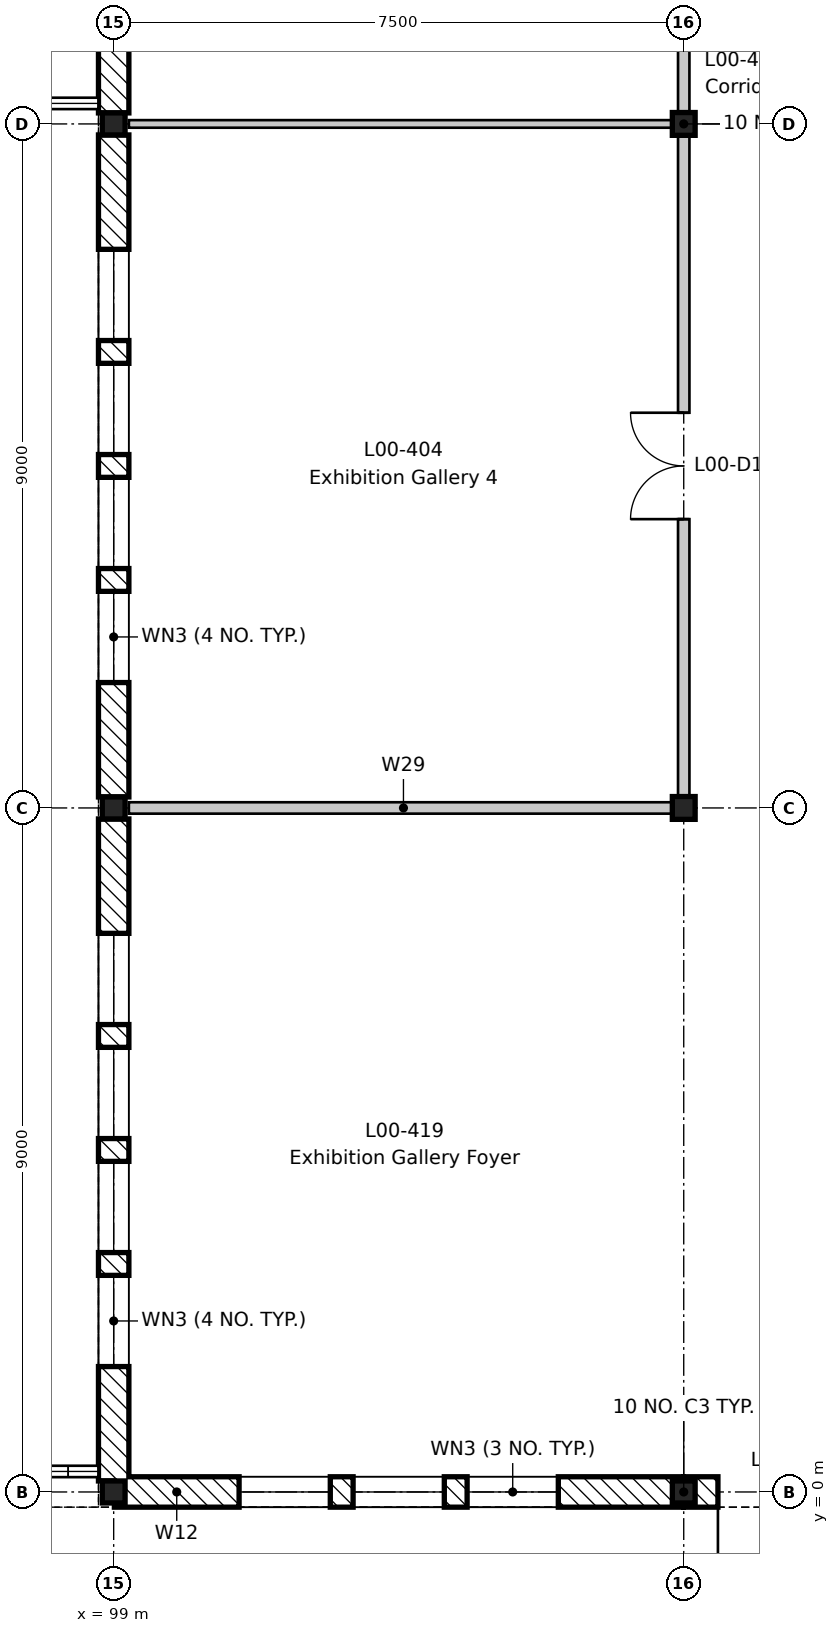
"""IFC4 building model, lengths in metres.
Left out: names, types, materials, properties, quantities, classifications, styles, units other than length and angle.
Written with IfcOpenShell. Run it as: python <this file> out.ifc"""

import sys

from ifc_helpers import new_model, si_unit, direction, frame, frame_2d, origin, origin_2d, place, context, subcontext, project, spatial, rectangle, i_section, extrude, element, fill, save


model = new_model("IFC4")
c1 = context("Model", 3, precision=1e-05, world=origin(), true_north=direction((0.0, 1.0)))
c2 = subcontext(c1, "Body", "Model", "MODEL_VIEW")
j1 = project(units=[si_unit("LENGTHUNIT", "METRE"), si_unit("PLANEANGLEUNIT", "RADIAN")], contexts=[c1])
p1 = place(None, origin())
s1 = spatial("IfcSite", under=j1, at=p1, CompositionType="ELEMENT")
p2 = place(p1, origin())
s2 = spatial("IfcBuilding", under=s1, at=p2, CompositionType="ELEMENT")
p3 = place(p2, origin())
s3 = spatial("IfcBuildingStorey", under=s2, at=p3, CompositionType="ELEMENT", Elevation=0.0)
for number, where, z_axis, x_axis in (
    (1, (99.0, 0.0, -0.6), (0.0, 0.0, 1.0), (1.0, 0.0, 0.0)),
    (2, (99.0, 9.0, -0.6), (0.0, 0.0, 1.0), (1.0, 0.0, 0.0)),
    (3, (99.0, 18.0, -0.6), (0.0, 0.0, 1.0), (1.0, 0.0, 0.0)),
    (4, (106.5, 0.0, -0.6), (0.0, 0.0, 1.0), (1.0, 0.0, 0.0)),
):
    element("IfcColumn", number, at=place(p3, frame(where, z_axis=z_axis, x_axis=x_axis)), inside=s3, PredefinedType="COLUMN", context=c2, shape_type="SweptSolid", body=[
        extrude(i_section(OverallWidth=0.3, OverallDepth=0.29, WebThickness=0.009, FlangeThickness=0.014, FilletRadius=0.027, at=origin_2d()), origin(), (0.0, 0.0, 1.0), 5.8),
    ])
for number, where, z_axis, x_axis in (
    (5, (106.5, 9.0, -0.6), (0.0, 0.0, 1.0), (1.0, 0.0, 0.0)),
    (6, (106.5, 18.0, -0.6), (0.0, 0.0, 1.0), (1.0, 0.0, 0.0)),
):
    element("IfcColumn", number, at=place(p3, frame(where, z_axis=z_axis, x_axis=x_axis)), inside=s3, PredefinedType="COLUMN", context=c2, shape_type="SweptSolid", body=[
        extrude(i_section(OverallWidth=0.3, OverallDepth=0.3, WebThickness=0.011, FlangeThickness=0.019, FilletRadius=0.027, at=origin_2d()), origin(), (0.0, 0.0, 1.0), 5.8),
    ])
p4 = place(p3, frame((99.0, 0.145, 0.0), z_axis=(0.0, 0.0, 1.0), x_axis=(0.0, 1.0, 0.0)))
e7 = element("IfcWall", 7, at=p4, inside=s3, PredefinedType="STANDARD", context=c2, shape_type="SweptSolid", body=[
    extrude(rectangle(XDim=8.71, YDim=0.4, at=frame_2d((4.355, 0.0))), origin(), (0.0, 0.0, 1.0), 4.8),
])
p5 = place(p4, frame((1.505, 0.0, 0.6)))
e8 = element("IfcOpeningElement", 8, at=p5, cuts=e7, PredefinedType="OPENING", context=c2, shape_type="SweptSolid", body=[
    extrude(rectangle(XDim=1.2, YDim=3.9, at=frame_2d((0.6, 1.95))), frame((0.0, 0.21, 0.0), z_axis=(0.0, -1.0, 0.0), x_axis=(1.0, 0.0, 0.0)), (0.0, 0.0, 1.0), 0.42),
])
p6 = place(p4, frame((3.005, 0.0, 0.6)))
e9 = element("IfcOpeningElement", 9, at=p6, cuts=e7, PredefinedType="OPENING", context=c2, shape_type="SweptSolid", body=[
    extrude(rectangle(XDim=1.2, YDim=3.9, at=frame_2d((0.6, 1.95))), frame((0.0, 0.21, 0.0), z_axis=(0.0, -1.0, 0.0), x_axis=(1.0, 0.0, 0.0)), (0.0, 0.0, 1.0), 0.42),
])
p7 = place(p4, frame((4.505, 0.0, 0.6)))
e10 = element("IfcOpeningElement", 10, at=p7, cuts=e7, PredefinedType="OPENING", context=c2, shape_type="SweptSolid", body=[
    extrude(rectangle(XDim=1.2, YDim=3.9, at=frame_2d((0.6, 1.95))), frame((0.0, 0.21, 0.0), z_axis=(0.0, -1.0, 0.0), x_axis=(1.0, 0.0, 0.0)), (0.0, 0.0, 1.0), 0.42),
])
p8 = place(p4, frame((6.005, 0.0, 0.6)))
e11 = element("IfcOpeningElement", 11, at=p8, cuts=e7, PredefinedType="OPENING", context=c2, shape_type="SweptSolid", body=[
    extrude(rectangle(XDim=1.2, YDim=3.9, at=frame_2d((0.6, 1.95))), frame((0.0, 0.21, 0.0), z_axis=(0.0, -1.0, 0.0), x_axis=(1.0, 0.0, 0.0)), (0.0, 0.0, 1.0), 0.42),
])
p9 = place(p3, frame((99.0, 9.145, 0.0), z_axis=(0.0, 0.0, 1.0), x_axis=(0.0, 1.0, 0.0)))
e12 = element("IfcWall", 12, at=p9, inside=s3, PredefinedType="STANDARD", context=c2, shape_type="SweptSolid", body=[
    extrude(rectangle(XDim=8.71, YDim=0.4, at=frame_2d((4.355, 0.0))), origin(), (0.0, 0.0, 1.0), 4.8),
])
p10 = place(p9, frame((1.505, 0.0, 0.6)))
e13 = element("IfcOpeningElement", 13, at=p10, cuts=e12, PredefinedType="OPENING", context=c2, shape_type="SweptSolid", body=[
    extrude(rectangle(XDim=1.2, YDim=3.9, at=frame_2d((0.6, 1.95))), frame((0.0, 0.21, 0.0), z_axis=(0.0, -1.0, 0.0), x_axis=(1.0, 0.0, 0.0)), (0.0, 0.0, 1.0), 0.42),
])
p11 = place(p9, frame((3.005, 0.0, 0.6)))
e14 = element("IfcOpeningElement", 14, at=p11, cuts=e12, PredefinedType="OPENING", context=c2, shape_type="SweptSolid", body=[
    extrude(rectangle(XDim=1.2, YDim=3.9, at=frame_2d((0.6, 1.95))), frame((0.0, 0.21, 0.0), z_axis=(0.0, -1.0, 0.0), x_axis=(1.0, 0.0, 0.0)), (0.0, 0.0, 1.0), 0.42),
])
p12 = place(p9, frame((4.505, 0.0, 0.6)))
e15 = element("IfcOpeningElement", 15, at=p12, cuts=e12, PredefinedType="OPENING", context=c2, shape_type="SweptSolid", body=[
    extrude(rectangle(XDim=1.2, YDim=3.9, at=frame_2d((0.6, 1.95))), frame((0.0, 0.21, 0.0), z_axis=(0.0, -1.0, 0.0), x_axis=(1.0, 0.0, 0.0)), (0.0, 0.0, 1.0), 0.42),
])
p13 = place(p9, frame((6.005, 0.0, 0.6)))
e16 = element("IfcOpeningElement", 16, at=p13, cuts=e12, PredefinedType="OPENING", context=c2, shape_type="SweptSolid", body=[
    extrude(rectangle(XDim=1.2, YDim=3.9, at=frame_2d((0.6, 1.95))), frame((0.0, 0.21, 0.0), z_axis=(0.0, -1.0, 0.0), x_axis=(1.0, 0.0, 0.0)), (0.0, 0.0, 1.0), 0.42),
])
p14 = place(p3, frame((99.0, 18.145, 0.0), z_axis=(0.0, 0.0, 1.0), x_axis=(0.0, 1.0, 0.0)))
e17 = element("IfcWall", 17, at=p14, inside=s3, PredefinedType="STANDARD", context=c2, shape_type="SweptSolid", body=[
    extrude(rectangle(XDim=8.71, YDim=0.4, at=frame_2d((4.355, 0.0))), origin(), (0.0, 0.0, 1.0), 4.8),
])
p15 = place(p14, frame((1.505, 0.0, 0.6)))
e18 = element("IfcOpeningElement", 18, at=p15, cuts=e17, PredefinedType="OPENING", context=c2, shape_type="SweptSolid", body=[
    extrude(rectangle(XDim=1.2, YDim=3.9, at=frame_2d((0.6, 1.95))), frame((0.0, 0.21, 0.0), z_axis=(0.0, -1.0, 0.0), x_axis=(1.0, 0.0, 0.0)), (0.0, 0.0, 1.0), 0.42),
])
p16 = place(p14, frame((3.005, 0.0, 0.6)))
e19 = element("IfcOpeningElement", 19, at=p16, cuts=e17, PredefinedType="OPENING", context=c2, shape_type="SweptSolid", body=[
    extrude(rectangle(XDim=1.2, YDim=3.9, at=frame_2d((0.6, 1.95))), frame((0.0, 0.21, 0.0), z_axis=(0.0, -1.0, 0.0), x_axis=(1.0, 0.0, 0.0)), (0.0, 0.0, 1.0), 0.42),
])
p17 = place(p14, frame((4.505, 0.0, 0.6)))
e20 = element("IfcOpeningElement", 20, at=p17, cuts=e17, PredefinedType="OPENING", context=c2, shape_type="SweptSolid", body=[
    extrude(rectangle(XDim=1.2, YDim=3.9, at=frame_2d((0.6, 1.95))), frame((0.0, 0.21, 0.0), z_axis=(0.0, -1.0, 0.0), x_axis=(1.0, 0.0, 0.0)), (0.0, 0.0, 1.0), 0.42),
])
p18 = place(p14, frame((6.005, 0.0, 0.6)))
e21 = element("IfcOpeningElement", 21, at=p18, cuts=e17, PredefinedType="OPENING", context=c2, shape_type="SweptSolid", body=[
    extrude(rectangle(XDim=1.2, YDim=3.9, at=frame_2d((0.6, 1.95))), frame((0.0, 0.21, 0.0), z_axis=(0.0, -1.0, 0.0), x_axis=(1.0, 0.0, 0.0)), (0.0, 0.0, 1.0), 0.42),
])
p19 = place(p3, frame((106.491, 0.0, 0.0), z_axis=(0.0, 0.0, 1.0), x_axis=(-1.0, 0.0, 0.0)))
e22 = element("IfcWall", 22, at=p19, inside=s3, PredefinedType="STANDARD", context=c2, shape_type="SweptSolid", body=[
    extrude(rectangle(XDim=7.481, YDim=0.4, at=frame_2d((3.741, 0.0))), origin(), (0.0, 0.0, 1.0), 4.87),
])
p20 = place(p19, frame((4.641, 0.0, 0.6)))
e23 = element("IfcOpeningElement", 23, at=p20, cuts=e22, PredefinedType="OPENING", context=c2, shape_type="SweptSolid", body=[
    extrude(rectangle(XDim=1.2, YDim=3.9, at=frame_2d((0.6, 1.95))), frame((0.0, 0.21, 0.0), z_axis=(0.0, -1.0, 0.0), x_axis=(1.0, 0.0, 0.0)), (0.0, 0.0, 1.0), 0.42),
])
p21 = place(p19, frame((3.141, 0.0, 0.6)))
e24 = element("IfcOpeningElement", 24, at=p21, cuts=e22, PredefinedType="OPENING", context=c2, shape_type="SweptSolid", body=[
    extrude(rectangle(XDim=1.2, YDim=3.9, at=frame_2d((0.6, 1.95))), frame((0.0, 0.21, 0.0), z_axis=(0.0, -1.0, 0.0), x_axis=(1.0, 0.0, 0.0)), (0.0, 0.0, 1.0), 0.42),
])
p22 = place(p19, frame((1.641, 0.0, 0.6)))
e25 = element("IfcOpeningElement", 25, at=p22, cuts=e22, PredefinedType="OPENING", context=c2, shape_type="SweptSolid", body=[
    extrude(rectangle(XDim=1.2, YDim=3.9, at=frame_2d((0.6, 1.95))), frame((0.0, 0.21, 0.0), z_axis=(0.0, -1.0, 0.0), x_axis=(1.0, 0.0, 0.0)), (0.0, 0.0, 1.0), 0.42),
])
p23 = place(p3, frame((109.491, 0.0, 0.0), z_axis=(0.0, 0.0, 1.0), x_axis=(-1.0, 0.0, 0.0)))
e26 = element("IfcWall", 26, at=p23, inside=s3, PredefinedType="STANDARD", context=c2, shape_type="SweptSolid", body=[
    extrude(rectangle(XDim=2.981, YDim=0.4, at=frame_2d((1.491, 0.0))), origin(), (0.0, 0.0, 1.0), 5.0),
])
p24 = place(p23, frame((0.441, 0.0, 0.0)))
e27 = element("IfcOpeningElement", 27, at=p24, cuts=e26, PredefinedType="OPENING", context=c2, shape_type="SweptSolid", body=[
    extrude(rectangle(XDim=2.1, YDim=2.4, at=frame_2d((1.05, 1.2))), frame((0.0, 0.21, 0.0), z_axis=(0.0, -1.0, 0.0), x_axis=(1.0, 0.0, 0.0)), (0.0, 0.0, 1.0), 0.42),
])
p25 = place(p3, frame((99.2, 9.0, 0.0), z_axis=(0.0, 0.0, 1.0), x_axis=(1.0, 0.0, 0.0)))
e28 = element("IfcWall", 28, at=p25, inside=s3, PredefinedType="PARTITIONING", context=c2, shape_type="SweptSolid", body=[
    extrude(rectangle(XDim=7.225, YDim=0.15, at=frame_2d((3.613, 0.0))), origin(), (0.0, 0.0, 1.0), 4.85),
])
p26 = place(p3, frame((99.2, 18.0, 0.0), z_axis=(0.0, 0.0, 1.0), x_axis=(1.0, 0.0, 0.0)))
e29 = element("IfcWall", 29, at=p26, inside=s3, PredefinedType="PARTITIONING", context=c2, shape_type="SweptSolid", body=[
    extrude(rectangle(XDim=7.225, YDim=0.1, at=frame_2d((3.613, 0.0))), origin(), (0.0, 0.0, 1.0), 4.85),
])
p27 = place(p3, frame((106.5, 9.0, 0.0), z_axis=(0.0, 0.0, 1.0), x_axis=(0.0, 1.0, 0.0)))
e30 = element("IfcWall", 30, at=p27, inside=s3, PredefinedType="PARTITIONING", context=c2, shape_type="SweptSolid", body=[
    extrude(rectangle(XDim=44.8, YDim=0.15, at=frame_2d((22.4, 0.0))), origin(), (0.0, 0.0, 1.0), 4.68),
])
p28 = place(p27, frame((3.8, 0.0, 0.0)))
e31 = element("IfcOpeningElement", 31, at=p28, cuts=e30, PredefinedType="OPENING", context=c2, shape_type="SweptSolid", body=[
    extrude(rectangle(XDim=1.4, YDim=2.1, at=frame_2d((0.7, 1.05))), frame((0.0, 0.085, 0.0), z_axis=(0.0, -1.0, 0.0), x_axis=(1.0, 0.0, 0.0)), (0.0, 0.0, 1.0), 0.17),
])
p29 = place(p27, frame((12.8, 0.0, 0.0)))
e32 = element("IfcOpeningElement", 32, at=p29, cuts=e30, PredefinedType="OPENING", context=c2, shape_type="SweptSolid", body=[
    extrude(rectangle(XDim=1.4, YDim=2.1, at=frame_2d((0.7, 1.05))), frame((0.0, 0.085, 0.0), z_axis=(0.0, -1.0, 0.0), x_axis=(1.0, 0.0, 0.0)), (0.0, 0.0, 1.0), 0.17),
])
p30 = place(p27, frame((21.8, 0.0, 0.0)))
e33 = element("IfcOpeningElement", 33, at=p30, cuts=e30, PredefinedType="OPENING", context=c2, shape_type="SweptSolid", body=[
    extrude(rectangle(XDim=1.4, YDim=2.1, at=frame_2d((0.7, 1.05))), frame((0.0, 0.085, 0.0), z_axis=(0.0, -1.0, 0.0), x_axis=(1.0, 0.0, 0.0)), (0.0, 0.0, 1.0), 0.17),
])
p31 = place(p27, frame((30.8, 0.0, 0.0)))
e34 = element("IfcOpeningElement", 34, at=p31, cuts=e30, PredefinedType="OPENING", context=c2, shape_type="SweptSolid", body=[
    extrude(rectangle(XDim=1.4, YDim=2.1, at=frame_2d((0.7, 1.05))), frame((0.0, 0.085, 0.0), z_axis=(0.0, -1.0, 0.0), x_axis=(1.0, 0.0, 0.0)), (0.0, 0.0, 1.0), 0.17),
])
p32 = place(p27, frame((39.8, 0.0, 0.0)))
e35 = element("IfcOpeningElement", 35, at=p32, cuts=e30, PredefinedType="OPENING", context=c2, shape_type="SweptSolid", body=[
    extrude(rectangle(XDim=1.4, YDim=2.1, at=frame_2d((0.7, 1.05))), frame((0.0, 0.085, 0.0), z_axis=(0.0, -1.0, 0.0), x_axis=(1.0, 0.0, 0.0)), (0.0, 0.0, 1.0), 0.17),
])
p33 = place(p5, origin())
e36 = element("IfcWindow", 36, at=p33, inside=s3, PartitioningType="SINGLE_PANEL", PredefinedType="WINDOW", context=c2, shape_type="SweptSolid", body=[
    extrude(rectangle(XDim=1.2, YDim=3.9, at=frame_2d((0.6, 1.95))), frame((0.0, 0.03, 0.0), z_axis=(0.0, -1.0, 0.0), x_axis=(1.0, 0.0, 0.0)), (0.0, 0.0, 1.0), 0.06),
])
fill(e8, e36)
p34 = place(p6, origin())
e37 = element("IfcWindow", 37, at=p34, inside=s3, PartitioningType="SINGLE_PANEL", PredefinedType="WINDOW", context=c2, shape_type="SweptSolid", body=[
    extrude(rectangle(XDim=1.2, YDim=3.9, at=frame_2d((0.6, 1.95))), frame((0.0, 0.03, 0.0), z_axis=(0.0, -1.0, 0.0), x_axis=(1.0, 0.0, 0.0)), (0.0, 0.0, 1.0), 0.06),
])
fill(e9, e37)
p35 = place(p7, origin())
e38 = element("IfcWindow", 38, at=p35, inside=s3, PartitioningType="SINGLE_PANEL", PredefinedType="WINDOW", context=c2, shape_type="SweptSolid", body=[
    extrude(rectangle(XDim=1.2, YDim=3.9, at=frame_2d((0.6, 1.95))), frame((0.0, 0.03, 0.0), z_axis=(0.0, -1.0, 0.0), x_axis=(1.0, 0.0, 0.0)), (0.0, 0.0, 1.0), 0.06),
])
fill(e10, e38)
p36 = place(p8, origin())
e39 = element("IfcWindow", 39, at=p36, inside=s3, PartitioningType="SINGLE_PANEL", PredefinedType="WINDOW", context=c2, shape_type="SweptSolid", body=[
    extrude(rectangle(XDim=1.2, YDim=3.9, at=frame_2d((0.6, 1.95))), frame((0.0, 0.03, 0.0), z_axis=(0.0, -1.0, 0.0), x_axis=(1.0, 0.0, 0.0)), (0.0, 0.0, 1.0), 0.06),
])
fill(e11, e39)
p37 = place(p10, origin())
e40 = element("IfcWindow", 40, at=p37, inside=s3, PartitioningType="SINGLE_PANEL", PredefinedType="WINDOW", context=c2, shape_type="SweptSolid", body=[
    extrude(rectangle(XDim=1.2, YDim=3.9, at=frame_2d((0.6, 1.95))), frame((0.0, 0.03, 0.0), z_axis=(0.0, -1.0, 0.0), x_axis=(1.0, 0.0, 0.0)), (0.0, 0.0, 1.0), 0.06),
])
fill(e13, e40)
p38 = place(p11, origin())
e41 = element("IfcWindow", 41, at=p38, inside=s3, PartitioningType="SINGLE_PANEL", PredefinedType="WINDOW", context=c2, shape_type="SweptSolid", body=[
    extrude(rectangle(XDim=1.2, YDim=3.9, at=frame_2d((0.6, 1.95))), frame((0.0, 0.03, 0.0), z_axis=(0.0, -1.0, 0.0), x_axis=(1.0, 0.0, 0.0)), (0.0, 0.0, 1.0), 0.06),
])
fill(e14, e41)
p39 = place(p12, origin())
e42 = element("IfcWindow", 42, at=p39, inside=s3, PartitioningType="SINGLE_PANEL", PredefinedType="WINDOW", context=c2, shape_type="SweptSolid", body=[
    extrude(rectangle(XDim=1.2, YDim=3.9, at=frame_2d((0.6, 1.95))), frame((0.0, 0.03, 0.0), z_axis=(0.0, -1.0, 0.0), x_axis=(1.0, 0.0, 0.0)), (0.0, 0.0, 1.0), 0.06),
])
fill(e15, e42)
p40 = place(p13, origin())
e43 = element("IfcWindow", 43, at=p40, inside=s3, PartitioningType="SINGLE_PANEL", PredefinedType="WINDOW", context=c2, shape_type="SweptSolid", body=[
    extrude(rectangle(XDim=1.2, YDim=3.9, at=frame_2d((0.6, 1.95))), frame((0.0, 0.03, 0.0), z_axis=(0.0, -1.0, 0.0), x_axis=(1.0, 0.0, 0.0)), (0.0, 0.0, 1.0), 0.06),
])
fill(e16, e43)
p41 = place(p20, origin())
e44 = element("IfcWindow", 44, at=p41, inside=s3, PartitioningType="SINGLE_PANEL", PredefinedType="WINDOW", context=c2, shape_type="SweptSolid", body=[
    extrude(rectangle(XDim=1.2, YDim=3.9, at=frame_2d((0.6, 1.95))), frame((0.0, 0.03, 0.0), z_axis=(0.0, -1.0, 0.0), x_axis=(1.0, 0.0, 0.0)), (0.0, 0.0, 1.0), 0.06),
])
fill(e23, e44)
p42 = place(p21, origin())
e45 = element("IfcWindow", 45, at=p42, inside=s3, PartitioningType="SINGLE_PANEL", PredefinedType="WINDOW", context=c2, shape_type="SweptSolid", body=[
    extrude(rectangle(XDim=1.2, YDim=3.9, at=frame_2d((0.6, 1.95))), frame((0.0, 0.03, 0.0), z_axis=(0.0, -1.0, 0.0), x_axis=(1.0, 0.0, 0.0)), (0.0, 0.0, 1.0), 0.06),
])
fill(e24, e45)
p43 = place(p22, origin())
e46 = element("IfcWindow", 46, at=p43, inside=s3, PartitioningType="SINGLE_PANEL", PredefinedType="WINDOW", context=c2, shape_type="SweptSolid", body=[
    extrude(rectangle(XDim=1.2, YDim=3.9, at=frame_2d((0.6, 1.95))), frame((0.0, 0.03, 0.0), z_axis=(0.0, -1.0, 0.0), x_axis=(1.0, 0.0, 0.0)), (0.0, 0.0, 1.0), 0.06),
])
fill(e25, e46)
p44 = place(p24, origin())
e47 = element("IfcDoor", 47, at=p44, inside=s3, OperationType="DOUBLE_DOOR_SINGLE_SWING", PredefinedType="DOOR", context=c2, shape_type="SweptSolid", body=[
    extrude(rectangle(XDim=2.1, YDim=2.4, at=frame_2d((1.05, 1.2))), frame((0.0, 0.025, 0.0), z_axis=(0.0, -1.0, 0.0), x_axis=(1.0, 0.0, 0.0)), (0.0, 0.0, 1.0), 0.05),
])
fill(e27, e47)
p45 = place(p28, origin())
e48 = element("IfcDoor", 48, at=p45, inside=s3, OperationType="DOUBLE_DOOR_SINGLE_SWING", PredefinedType="DOOR", context=c2, shape_type="SweptSolid", body=[
    extrude(rectangle(XDim=1.4, YDim=2.1, at=frame_2d((0.7, 1.05))), frame((0.0, 0.025, 0.0), z_axis=(0.0, -1.0, 0.0), x_axis=(1.0, 0.0, 0.0)), (0.0, 0.0, 1.0), 0.05),
])
fill(e31, e48)
save(model, sys.argv[1])
